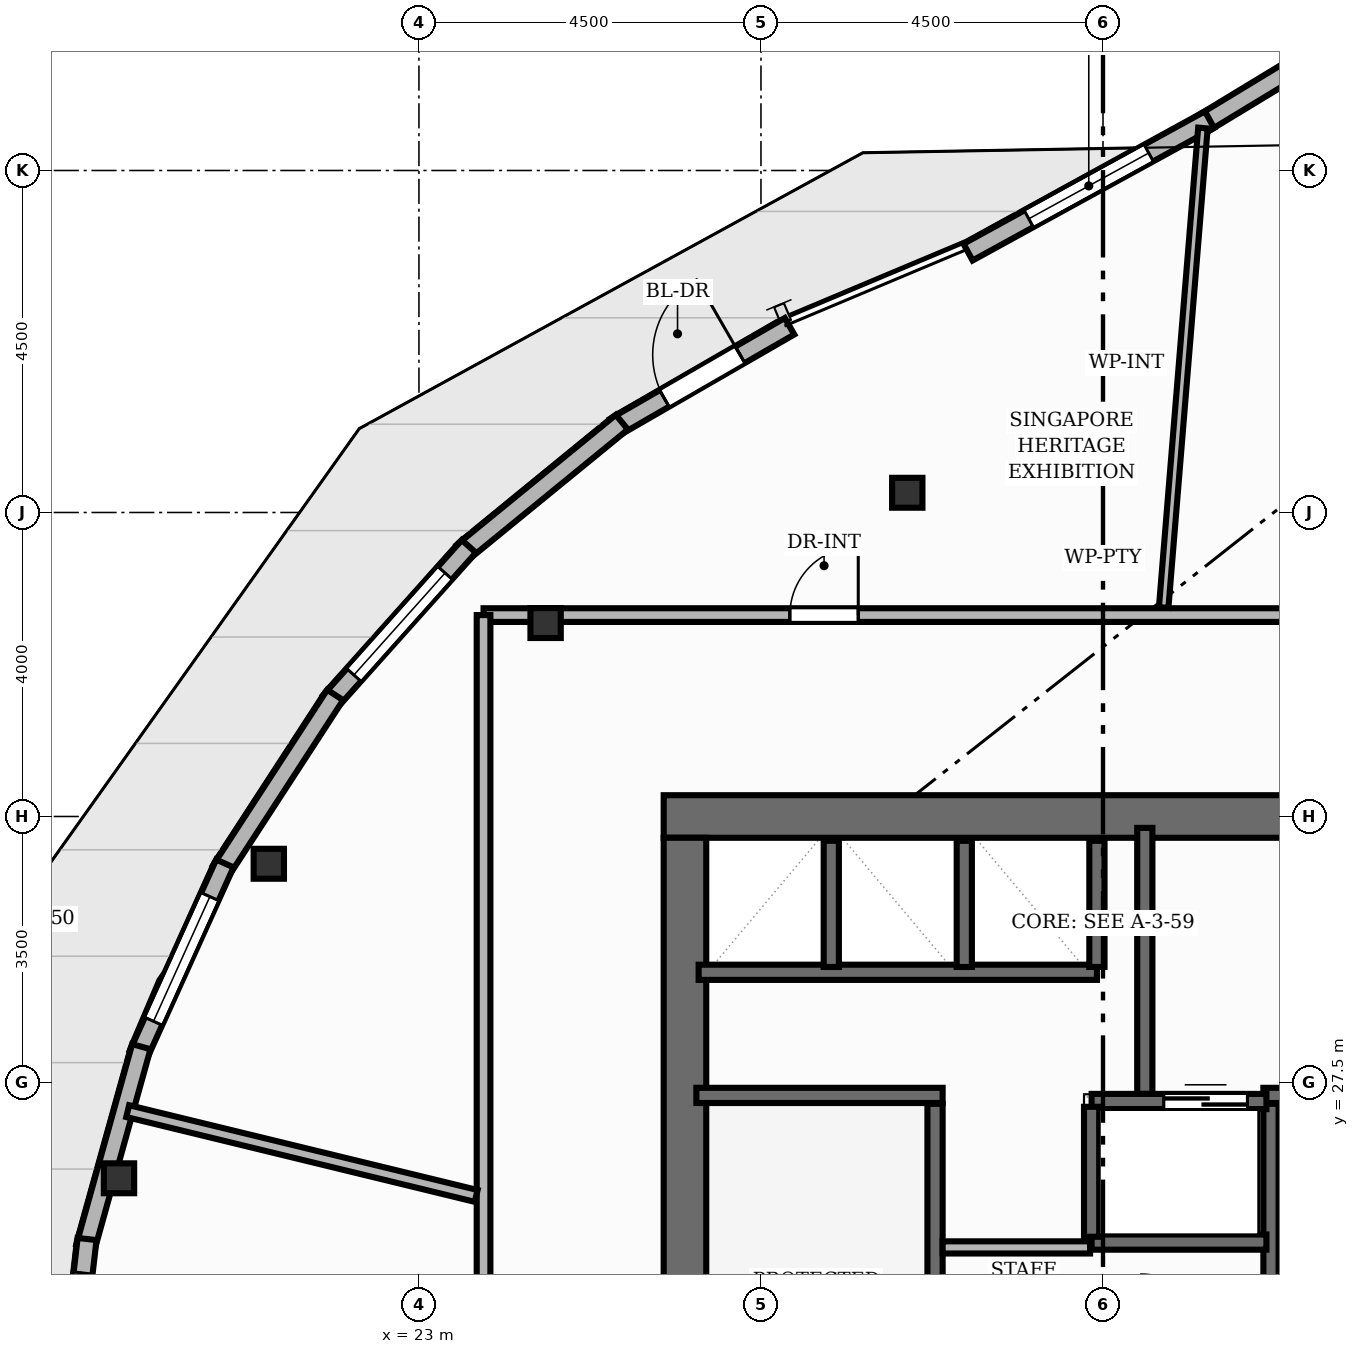
"""IFC4 building model, lengths in metres.
Left out: names, types, materials, properties, quantities, classifications, styles, units other than length and angle.
Written with IfcOpenShell. Run it as: python <this file> out.ifc"""

import sys

from ifc_helpers import new_model, si_unit, direction, frame, frame_2d, origin, origin_2d, place, context, subcontext, project, spatial, rectangle, i_section, extrude, element, fill, save


model = new_model("IFC4")
c1 = context("Model", 3, precision=1e-05, world=origin(), true_north=direction((0.0, 1.0)))
c2 = subcontext(c1, "Body", "Model", "MODEL_VIEW")
j1 = project(units=[si_unit("LENGTHUNIT", "METRE"), si_unit("PLANEANGLEUNIT", "RADIAN")], contexts=[c1])
p1 = place(None, origin())
s1 = spatial("IfcSite", under=j1, at=p1, CompositionType="ELEMENT")
p2 = place(p1, origin())
s2 = spatial("IfcBuilding", under=s1, at=p2, CompositionType="ELEMENT")
p3 = place(p2, frame((0.0, 0.0, 243.04)))
s3 = spatial("IfcBuildingStorey", under=s2, at=p3, CompositionType="ELEMENT", Elevation=243.04)
p4 = place(p3, frame((26.22, 31.0, 0.0), z_axis=(0.0, 0.0, 1.0), x_axis=(1.0, 0.0, 0.0)))
e1 = element("IfcWall", 1, at=p4, inside=s3, PredefinedType="SHEAR", context=c2, shape_type="SweptSolid", body=[
    extrude(rectangle(XDim=11.56, YDim=0.56, at=frame_2d((5.78, 0.0))), origin(), (0.0, 0.0, 1.0), 3.84),
])
p5 = place(p4, frame((8.18, 0.0, 0.0)))
e2 = element("IfcOpeningElement", 2, at=p5, cuts=e1, PredefinedType="OPENING", context=c2, shape_type="SweptSolid", body=[
    extrude(rectangle(XDim=1.1, YDim=2.0, at=frame_2d((0.55, 1.0))), frame((0.0, 0.29, 0.0), z_axis=(0.0, -1.0, 0.0), x_axis=(1.0, 0.0, 0.0)), (0.0, 0.0, 1.0), 0.58),
])
p6 = place(p3, frame((26.5, 17.28, 0.0), z_axis=(0.0, 0.0, 1.0), x_axis=(0.0, 1.0, 0.0)))
e3 = element("IfcWall", 3, at=p6, inside=s3, PredefinedType="SHEAR", context=c2, shape_type="SweptSolid", body=[
    extrude(rectangle(XDim=13.44, YDim=0.56, at=frame_2d((6.72, 0.0))), origin(), (0.0, 0.0, 1.0), 3.84),
])
for number, where, z_axis, x_axis in (
    (4, (29.425, 35.26, 0.0), (0.0, 0.0, 1.0), (1.0, 0.0, 0.0)),
    (5, (24.667, 33.545, 0.0), (0.0, 0.0, 1.0), (1.0, 0.0, 0.0)),
    (6, (21.025, 30.378, 0.0), (0.0, 0.0, 1.0), (1.0, 0.0, 0.0)),
    (7, (19.054, 26.24, 0.0), (0.0, 0.0, 1.0), (1.0, 0.0, 0.0)),
):
    element("IfcColumn", number, at=place(p3, frame(where, z_axis=z_axis, x_axis=x_axis)), inside=s3, PredefinedType="COLUMN", context=c2, shape_type="SweptSolid", body=[
        extrude(i_section(OverallWidth=0.399, OverallDepth=0.394, WebThickness=0.023, FlangeThickness=0.037, at=origin_2d()), origin(), (0.0, 0.0, 1.0), 3.84),
    ])
p7 = place(p3, frame((33.328, 40.127, 0.0), z_axis=(0.0, 0.0, 1.0), x_axis=(0.854986749767, 0.518649841148, 0.0)))
e8 = element("IfcWall", 8, at=p7, inside=s3, PredefinedType="SOLIDWALL", context=c2, shape_type="SweptSolid", body=[
    extrude(rectangle(XDim=4.289, YDim=0.25, at=frame_2d((2.145, 0.0))), origin(), (0.0, 0.0, 1.0), 3.52),
])
p8 = place(p3, frame((30.224, 38.425, 0.0), z_axis=(0.0, 0.0, 1.0), x_axis=(0.876630929742, 0.481163395344, 0.0)))
e9 = element("IfcWall", 9, at=p8, inside=s3, PredefinedType="SOLIDWALL", context=c2, shape_type="SweptSolid", body=[
    extrude(rectangle(XDim=3.624, YDim=0.25, at=frame_2d((1.812, 0.0))), origin(), (0.0, 0.0, 1.0), 3.52),
])
p9 = place(p8, frame((0.912, 0.0, 0.85)))
e10 = element("IfcOpeningElement", 10, at=p9, cuts=e9, PredefinedType="OPENING", context=c2, shape_type="SweptSolid", body=[
    extrude(rectangle(XDim=1.8, YDim=2.0, at=frame_2d((0.9, 1.0))), frame((0.0, 0.135, 0.0), z_axis=(0.0, -1.0, 0.0), x_axis=(1.0, 0.0, 0.0)), (0.0, 0.0, 1.0), 0.27),
])
p10 = place(p3, frame((25.58, 36.125, 0.0), z_axis=(0.0, 0.0, 1.0), x_axis=(0.86612117946, 0.49983407496, 0.0)))
e11 = element("IfcWall", 11, at=p10, inside=s3, PredefinedType="SOLIDWALL", context=c2, shape_type="SweptSolid", body=[
    extrude(rectangle(XDim=2.651, YDim=0.25, at=frame_2d((1.325, 0.0))), origin(), (0.0, 0.0, 1.0), 3.52),
])
p11 = place(p10, frame((0.75, 0.0, 0.0)))
e12 = element("IfcOpeningElement", 12, at=p11, cuts=e11, PredefinedType="OPENING", context=c2, shape_type="SweptSolid", body=[
    extrude(rectangle(XDim=1.15, YDim=2.2, at=frame_2d((0.575, 1.1))), frame((0.0, 0.135, 0.0), z_axis=(0.0, -1.0, 0.0), x_axis=(1.0, 0.0, 0.0)), (0.0, 0.0, 1.0), 0.27),
])
p12 = place(p3, frame((23.578, 34.479, 0.0), z_axis=(0.0, 0.0, 1.0), x_axis=(0.774355745343, 0.632750487676, 0.0)))
e13 = element("IfcWall", 13, at=p12, inside=s3, PredefinedType="SOLIDWALL", context=c2, shape_type="SweptSolid", body=[
    extrude(rectangle(XDim=2.702, YDim=0.25, at=frame_2d((1.351, 0.0))), origin(), (0.0, 0.0, 1.0), 3.52),
])
p13 = place(p3, frame((21.832, 32.512, 0.0), z_axis=(0.0, 0.0, 1.0), x_axis=(0.666463852193, 0.745537345624, 0.0)))
e14 = element("IfcWall", 14, at=p13, inside=s3, PredefinedType="SOLIDWALL", context=c2, shape_type="SweptSolid", body=[
    extrude(rectangle(XDim=2.739, YDim=0.25, at=frame_2d((1.369, 0.0))), origin(), (0.0, 0.0, 1.0), 3.52),
])
p14 = place(p13, frame((0.469, 0.0, 0.85)))
e15 = element("IfcOpeningElement", 15, at=p14, cuts=e14, PredefinedType="OPENING", context=c2, shape_type="SweptSolid", body=[
    extrude(rectangle(XDim=1.8, YDim=2.0, at=frame_2d((0.9, 1.0))), frame((0.0, 0.135, 0.0), z_axis=(0.0, -1.0, 0.0), x_axis=(1.0, 0.0, 0.0)), (0.0, 0.0, 1.0), 0.27),
])
p15 = place(p3, frame((20.395, 30.287, 0.0), z_axis=(0.0, 0.0, 1.0), x_axis=(0.545041246002, 0.838409231913, 0.0)))
e16 = element("IfcWall", 16, at=p15, inside=s3, PredefinedType="SOLIDWALL", context=c2, shape_type="SweptSolid", body=[
    extrude(rectangle(XDim=2.758, YDim=0.25, at=frame_2d((1.379, 0.0))), origin(), (0.0, 0.0, 1.0), 3.52),
])
p16 = place(p3, frame((19.31, 27.869, 0.0), z_axis=(0.0, 0.0, 1.0), x_axis=(0.411961415151, 0.911201290839, 0.0)))
e17 = element("IfcWall", 17, at=p16, inside=s3, PredefinedType="SOLIDWALL", context=c2, shape_type="SweptSolid", body=[
    extrude(rectangle(XDim=2.758, YDim=0.25, at=frame_2d((1.379, 0.0))), origin(), (0.0, 0.0, 1.0), 3.52),
])
p17 = place(p16, frame((0.479, 0.0, 0.85)))
e18 = element("IfcOpeningElement", 18, at=p17, cuts=e17, PredefinedType="OPENING", context=c2, shape_type="SweptSolid", body=[
    extrude(rectangle(XDim=1.8, YDim=2.0, at=frame_2d((0.9, 1.0))), frame((0.0, 0.135, 0.0), z_axis=(0.0, -1.0, 0.0), x_axis=(1.0, 0.0, 0.0)), (0.0, 0.0, 1.0), 0.27),
])
p18 = place(p3, frame((18.613, 25.333, 0.0), z_axis=(0.0, 0.0, 1.0), x_axis=(0.268356519564, 0.963319665743, 0.0)))
e19 = element("IfcWall", 19, at=p18, inside=s3, PredefinedType="SOLIDWALL", context=c2, shape_type="SweptSolid", body=[
    extrude(rectangle(XDim=2.738, YDim=0.25, at=frame_2d((1.369, 0.0))), origin(), (0.0, 0.0, 1.0), 3.137),
])
p19 = place(p3, frame((18.323, 22.757, 0.0), z_axis=(0.0, 0.0, 1.0), x_axis=(0.115121415392, 0.993351428105, 0.0)))
e20 = element("IfcWall", 20, at=p19, inside=s3, PredefinedType="SOLIDWALL", context=c2, shape_type="SweptSolid", body=[
    extrude(rectangle(XDim=2.702, YDim=0.25, at=frame_2d((1.351, 0.0))), origin(), (0.0, 0.0, 1.0), 3.137),
])
p20 = place(p19, frame((0.451, 0.0, 0.85)))
e21 = element("IfcOpeningElement", 21, at=p20, cuts=e20, PredefinedType="OPENING", context=c2, shape_type="SweptSolid", body=[
    extrude(rectangle(XDim=1.8, YDim=2.0, at=frame_2d((0.9, 1.0))), frame((0.0, 0.135, 0.0), z_axis=(0.0, -1.0, 0.0), x_axis=(1.0, 0.0, 0.0)), (0.0, 0.0, 1.0), 0.27),
])
p21 = place(p3, frame((29.79, 20.78, 0.0), z_axis=(0.0, 0.0, 1.0), x_axis=(0.0, 1.0, 0.0)))
e22 = element("IfcWall", 22, at=p21, inside=s3, PredefinedType="SHEAR", context=c2, shape_type="SweptSolid", body=[
    extrude(rectangle(XDim=6.44, YDim=0.2, at=frame_2d((3.22, 0.0))), origin(), (0.0, 0.0, 1.0), 3.84),
])
p22 = place(p3, frame((26.65, 27.33, 0.0), z_axis=(0.0, 0.0, 1.0), x_axis=(1.0, 0.0, 0.0)))
e23 = element("IfcWall", 23, at=p22, inside=s3, PredefinedType="SHEAR", context=c2, shape_type="SweptSolid", body=[
    extrude(rectangle(XDim=3.24, YDim=0.2, at=frame_2d((1.62, 0.0))), origin(), (0.0, 0.0, 1.0), 3.84),
])
p23 = place(p3, frame((34.21, 20.78, 0.0), z_axis=(0.0, 0.0, 1.0), x_axis=(0.0, 1.0, 0.0)))
e24 = element("IfcWall", 24, at=p23, inside=s3, PredefinedType="SHEAR", context=c2, shape_type="SweptSolid", body=[
    extrude(rectangle(XDim=6.44, YDim=0.2, at=frame_2d((3.22, 0.0))), origin(), (0.0, 0.0, 1.0), 3.84),
])
p24 = place(p3, frame((34.11, 27.33, 0.0), z_axis=(0.0, 0.0, 1.0), x_axis=(1.0, 0.0, 0.0)))
e25 = element("IfcWall", 25, at=p24, inside=s3, PredefinedType="SHEAR", context=c2, shape_type="SweptSolid", body=[
    extrude(rectangle(XDim=3.24, YDim=0.2, at=frame_2d((1.62, 0.0))), origin(), (0.0, 0.0, 1.0), 3.84),
])
p25 = place(p24, frame((1.135, 0.0, 0.0)))
e26 = element("IfcOpeningElement", 26, at=p25, cuts=e25, PredefinedType="OPENING", context=c2, shape_type="SweptSolid", body=[
    extrude(rectangle(XDim=1.05, YDim=2.15, at=frame_2d((0.525, 1.075))), frame((0.0, 0.11, 0.0), z_axis=(0.0, -1.0, 0.0), x_axis=(1.0, 0.0, 0.0)), (0.0, 0.0, 1.0), 0.22),
])
p26 = place(p3, frame((32.55, 27.35, 0.0), z_axis=(0.0, 0.0, 1.0), x_axis=(0.0, 1.0, 0.0)))
e27 = element("IfcWall", 27, at=p26, inside=s3, PredefinedType="SHEAR", context=c2, shape_type="SweptSolid", body=[
    extrude(rectangle(XDim=3.5, YDim=0.2, at=frame_2d((1.75, 0.0))), origin(), (0.0, 0.0, 1.0), 3.84),
])
p27 = place(p3, frame((31.85, 27.25, 0.0), z_axis=(0.0, 0.0, 1.0), x_axis=(1.0, 0.0, 0.0)))
e28 = element("IfcWall", 28, at=p27, inside=s3, PredefinedType="SHEAR", context=c2, shape_type="SweptSolid", body=[
    extrude(rectangle(XDim=2.3, YDim=0.2, at=frame_2d((1.15, 0.0))), origin(), (0.0, 0.0, 1.0), 3.84),
])
p28 = place(p27, frame((0.95, 0.0, 0.0)))
e29 = element("IfcOpeningElement", 29, at=p28, cuts=e28, PredefinedType="OPENING", context=c2, shape_type="SweptSolid", body=[
    extrude(rectangle(XDim=1.1, YDim=2.15, at=frame_2d((0.55, 1.075))), frame((0.0, 0.11, 0.0), z_axis=(0.0, -1.0, 0.0), x_axis=(1.0, 0.0, 0.0)), (0.0, 0.0, 1.0), 0.22),
])
p29 = place(p3, frame((31.85, 25.4, 0.0), z_axis=(0.0, 0.0, 1.0), x_axis=(1.0, 0.0, 0.0)))
e30 = element("IfcWall", 30, at=p29, inside=s3, PredefinedType="SHEAR", context=c2, shape_type="SweptSolid", body=[
    extrude(rectangle(XDim=2.3, YDim=0.2, at=frame_2d((1.15, 0.0))), origin(), (0.0, 0.0, 1.0), 3.84),
])
p30 = place(p3, frame((31.85, 25.47, 0.0), z_axis=(0.0, 0.0, 1.0), x_axis=(0.0, 1.0, 0.0)))
e31 = element("IfcWall", 31, at=p30, inside=s3, PredefinedType="SHEAR", context=c2, shape_type="SweptSolid", body=[
    extrude(rectangle(XDim=1.71, YDim=0.2, at=frame_2d((0.855, 0.0))), origin(), (0.0, 0.0, 1.0), 3.84),
])
p31 = place(p3, frame((26.68, 28.95, 0.0), z_axis=(0.0, 0.0, 1.0), x_axis=(1.0, 0.0, 0.0)))
e32 = element("IfcWall", 32, at=p31, inside=s3, PredefinedType="SHEAR", context=c2, shape_type="SweptSolid", body=[
    extrude(rectangle(XDim=5.24, YDim=0.2, at=frame_2d((2.62, 0.0))), origin(), (0.0, 0.0, 1.0), 3.84),
])
for number, where, z_axis, x_axis in (
    (33, (31.92, 29.02, 0.0), (0.0, 0.0, 1.0), (0.0, 1.0, 0.0)),
    (34, (28.425, 29.02, 0.0), (0.0, 0.0, 1.0), (0.0, 1.0, 0.0)),
    (35, (30.175, 29.02, 0.0), (0.0, 0.0, 1.0), (0.0, 1.0, 0.0)),
):
    element("IfcWall", number, at=place(p3, frame(where, z_axis=z_axis, x_axis=x_axis)), inside=s3, PredefinedType="SHEAR", context=c2, shape_type="SweptSolid", body=[
        extrude(rectangle(XDim=1.66, YDim=0.2, at=frame_2d((0.83, 0.0))), origin(), (0.0, 0.0, 1.0), 3.84),
    ])
p32 = place(p3, frame((29.89, 25.33, 0.0), z_axis=(0.0, 0.0, 1.0), x_axis=(1.0, 0.0, 0.0)))
e36 = element("IfcWall", 36, at=p32, inside=s3, PredefinedType="PLUMBINGWALL", context=c2, shape_type="SweptSolid", body=[
    extrude(rectangle(XDim=1.94, YDim=0.16, at=frame_2d((0.97, 0.0))), origin(), (0.0, 0.0, 1.0), 3.515),
])
p33 = place(p3, frame((23.85, 33.65, 0.0), z_axis=(0.0, 0.0, 1.0), x_axis=(1.0, 0.0, 0.0)))
e37 = element("IfcWall", 37, at=p33, inside=s3, PredefinedType="PARTITIONING", context=c2, shape_type="SweptSolid", body=[
    extrude(rectangle(XDim=16.3, YDim=0.18, at=frame_2d((8.15, 0.0))), origin(), (0.0, 0.0, 1.0), 2.878),
])
p34 = place(p33, frame((12.16, 0.0, 0.0)))
e38 = element("IfcOpeningElement", 38, at=p34, cuts=e37, PredefinedType="OPENING", context=c2, shape_type="SweptSolid", body=[
    extrude(rectangle(XDim=0.9, YDim=2.1, at=frame_2d((0.45, 1.05))), frame((0.0, 0.1, 0.0), z_axis=(0.0, -1.0, 0.0), x_axis=(1.0, 0.0, 0.0)), (0.0, 0.0, 1.0), 0.2),
])
p35 = place(p33, frame((4.03, 0.0, 0.0)))
e39 = element("IfcOpeningElement", 39, at=p35, cuts=e37, PredefinedType="OPENING", context=c2, shape_type="SweptSolid", body=[
    extrude(rectangle(XDim=0.9, YDim=2.1, at=frame_2d((0.45, 1.05))), frame((0.0, 0.1, 0.0), z_axis=(0.0, -1.0, 0.0), x_axis=(1.0, 0.0, 0.0)), (0.0, 0.0, 1.0), 0.2),
])
p36 = place(p3, frame((23.85, 14.35, 0.0), z_axis=(0.0, 0.0, 1.0), x_axis=(0.0, 1.0, 0.0)))
e40 = element("IfcWall", 40, at=p36, inside=s3, PredefinedType="PARTITIONING", context=c2, shape_type="SweptSolid", body=[
    extrude(rectangle(XDim=19.3, YDim=0.18, at=frame_2d((9.65, 0.0))), origin(), (0.0, 0.0, 1.0), 3.515),
])
p37 = place(p36, frame((5.377, 0.0, 0.0)))
e41 = element("IfcOpeningElement", 41, at=p37, cuts=e40, PredefinedType="OPENING", context=c2, shape_type="SweptSolid", body=[
    extrude(rectangle(XDim=0.9, YDim=2.1, at=frame_2d((0.45, 1.05))), frame((0.0, 0.1, 0.0), z_axis=(0.0, -1.0, 0.0), x_axis=(1.0, 0.0, 0.0)), (0.0, 0.0, 1.0), 0.2),
])
p38 = place(p3, frame((32.798, 33.75, 0.0), z_axis=(0.0, 0.0, 1.0), x_axis=(0.081612219351, 0.996664158908, 0.0)))
e42 = element("IfcWall", 42, at=p38, inside=s3, PredefinedType="PARTITIONING", context=c2, shape_type="SweptSolid", body=[
    extrude(rectangle(XDim=6.33, YDim=0.125, at=frame_2d((3.165, 0.0))), origin(), (0.0, 0.0, 1.0), 3.515),
])
p39 = place(p3, frame((23.753, 26.007, 0.0), z_axis=(0.0, 0.0, 1.0), x_axis=(-0.971624549103, 0.236528509024, 0.0)))
e43 = element("IfcWall", 43, at=p39, inside=s3, PredefinedType="PLUMBINGWALL", context=c2, shape_type="SweptSolid", body=[
    extrude(rectangle(XDim=4.718, YDim=0.16, at=frame_2d((2.359, 0.0))), origin(), (0.0, 0.0, 1.0), 3.515),
])
p40 = place(p11, origin())
e44 = element("IfcDoor", 44, at=p40, inside=s3, OperationType="SINGLE_SWING_RIGHT", PredefinedType="DOOR", context=c2, shape_type="SweptSolid", body=[
    extrude(rectangle(XDim=1.15, YDim=2.2, at=frame_2d((0.575, 1.1))), frame((0.0, 0.025, 0.0), z_axis=(0.0, -1.0, 0.0), x_axis=(1.0, 0.0, 0.0)), (0.0, 0.0, 1.0), 0.05),
])
fill(e12, e44)
p41 = place(p9, origin())
e45 = element("IfcWindow", 45, at=p41, inside=s3, PartitioningType="SINGLE_PANEL", PredefinedType="WINDOW", context=c2, shape_type="SweptSolid", body=[
    extrude(rectangle(XDim=1.8, YDim=2.0, at=frame_2d((0.9, 1.0))), frame((0.0, 0.03, 0.0), z_axis=(0.0, -1.0, 0.0), x_axis=(1.0, 0.0, 0.0)), (0.0, 0.0, 1.0), 0.06),
])
fill(e10, e45)
p42 = place(p14, origin())
e46 = element("IfcWindow", 46, at=p42, inside=s3, PartitioningType="SINGLE_PANEL", PredefinedType="WINDOW", context=c2, shape_type="SweptSolid", body=[
    extrude(rectangle(XDim=1.8, YDim=2.0, at=frame_2d((0.9, 1.0))), frame((0.0, 0.03, 0.0), z_axis=(0.0, -1.0, 0.0), x_axis=(1.0, 0.0, 0.0)), (0.0, 0.0, 1.0), 0.06),
])
fill(e15, e46)
p43 = place(p17, origin())
e47 = element("IfcWindow", 47, at=p43, inside=s3, PartitioningType="SINGLE_PANEL", PredefinedType="WINDOW", context=c2, shape_type="SweptSolid", body=[
    extrude(rectangle(XDim=1.8, YDim=2.0, at=frame_2d((0.9, 1.0))), frame((0.0, 0.03, 0.0), z_axis=(0.0, -1.0, 0.0), x_axis=(1.0, 0.0, 0.0)), (0.0, 0.0, 1.0), 0.06),
])
fill(e18, e47)
p44 = place(p20, origin())
e48 = element("IfcWindow", 48, at=p44, inside=s3, PartitioningType="SINGLE_PANEL", PredefinedType="WINDOW", context=c2, shape_type="SweptSolid", body=[
    extrude(rectangle(XDim=1.8, YDim=2.0, at=frame_2d((0.9, 1.0))), frame((0.0, 0.03, 0.0), z_axis=(0.0, -1.0, 0.0), x_axis=(1.0, 0.0, 0.0)), (0.0, 0.0, 1.0), 0.06),
])
fill(e21, e48)
p45 = place(p28, origin())
e49 = element("IfcDoor", 49, at=p45, inside=s3, OperationType="DOUBLE_DOOR_SLIDING", PredefinedType="DOOR", context=c2, shape_type="SweptSolid", body=[
    extrude(rectangle(XDim=1.1, YDim=2.15, at=frame_2d((0.55, 1.075))), frame((0.0, 0.025, 0.0), z_axis=(0.0, -1.0, 0.0), x_axis=(1.0, 0.0, 0.0)), (0.0, 0.0, 1.0), 0.05),
])
fill(e29, e49)
p46 = place(p35, origin())
e50 = element("IfcDoor", 50, at=p46, inside=s3, OperationType="SINGLE_SWING_RIGHT", PredefinedType="DOOR", context=c2, shape_type="SweptSolid", body=[
    extrude(rectangle(XDim=0.9, YDim=2.1, at=frame_2d((0.45, 1.05))), frame((0.0, 0.025, 0.0), z_axis=(0.0, -1.0, 0.0), x_axis=(1.0, 0.0, 0.0)), (0.0, 0.0, 1.0), 0.05),
])
fill(e39, e50)
save(model, sys.argv[1])
